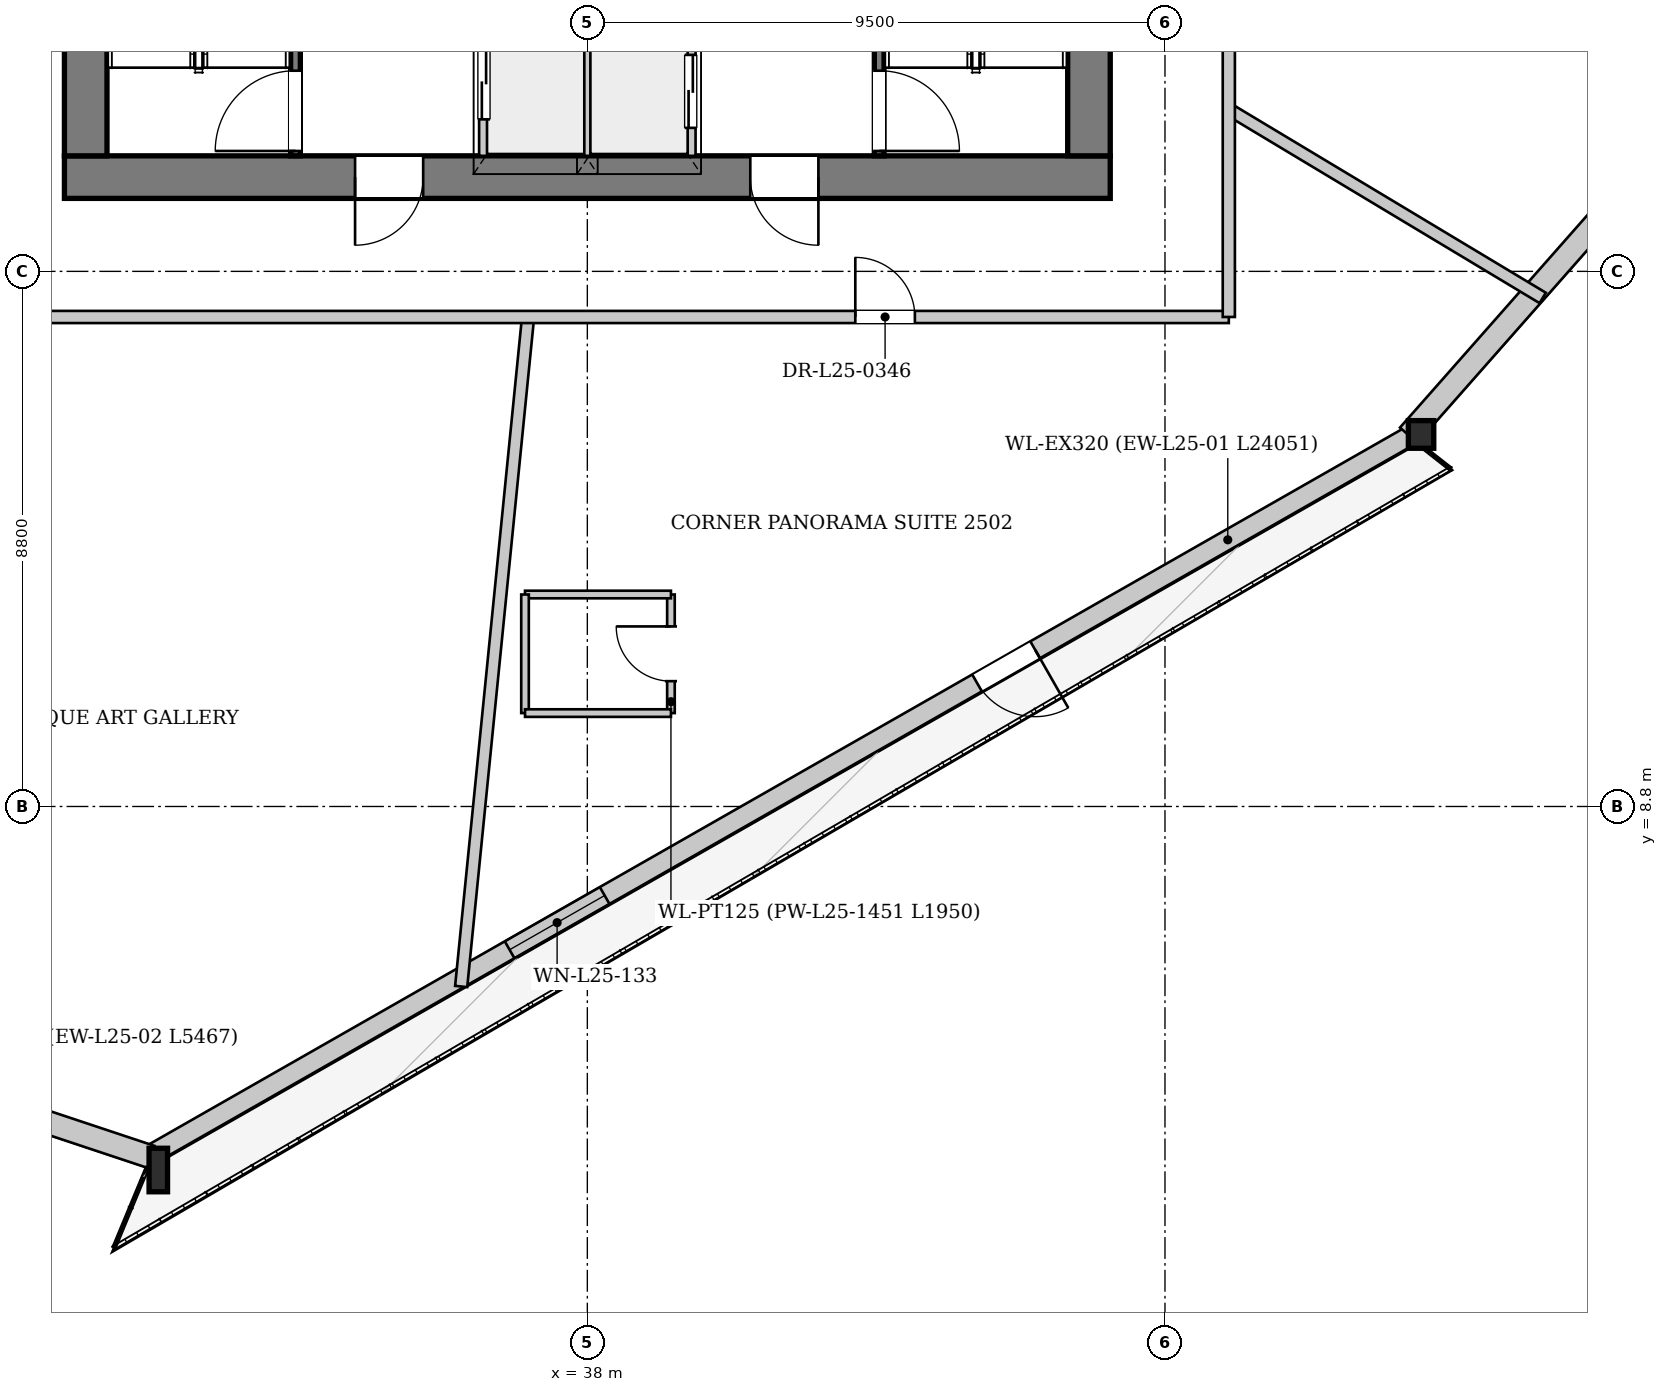
"""IFC4 building model, lengths in metres.
Left out: names, types, materials, properties, quantities, classifications, styles, units other than length and angle.
Written with IfcOpenShell. Run it as: python <this file> out.ifc"""

import sys

from ifc_helpers import new_model, si_unit, direction, frame, frame_2d, origin, origin_2d, place, context, subcontext, project, spatial, rectangle, i_section, extrude, source, transform, mapped, element, fill, save


model = new_model("IFC4")
c1 = context("Model", 3, precision=1e-05, world=origin(), true_north=direction((0.0, 1.0)))
c2 = subcontext(c1, "Body", "Model", "MODEL_VIEW")
j1 = project(units=[si_unit("LENGTHUNIT", "METRE"), si_unit("PLANEANGLEUNIT", "RADIAN")], contexts=[c1])
p1 = place(None, origin())
s1 = spatial("IfcSite", under=j1, at=p1, CompositionType="ELEMENT")
p2 = place(p1, origin())
s2 = spatial("IfcBuilding", under=s1, at=p2, CompositionType="ELEMENT")
p3 = place(p2, frame((0.0, 0.0, 98.6)))
s3 = spatial("IfcBuildingStorey", under=s2, at=p3, CompositionType="ELEMENT", Elevation=98.6)
m1 = source(origin(), c2, "Body", "SweptSolid", [
    extrude(i_section(OverallWidth=0.304, OverallDepth=0.716, WebThickness=0.021, FlangeThickness=0.04, at=origin_2d()), origin(), (0.0, 0.0, 1.0), 3.405),
])
p4 = place(p3, frame((30.762, 2.858, 0.0), z_axis=(0.107037692967, -0.021436215805, 0.994023853304), x_axis=(0.196368725397, 0.980530123803, 0.0)))
e1 = element("IfcColumn", 1, at=p4, inside=s3, PredefinedType="COLUMN", context=c2, shape_type="MappedRepresentation", body=[
    mapped(m1, transform((0.0, 0.0, 0.0), x_axis=(1.0, 0.0, 0.0), y_axis=(0.0, 1.0, 0.0), z_axis=(0.0, 0.0, 1.0), scale=1.0)),
])
m2 = source(origin(), c2, "Body", "SweptSolid", [
    extrude(i_section(OverallWidth=0.418, OverallDepth=0.455, WebThickness=0.038, FlangeThickness=0.059, at=origin_2d()), origin(), (0.0, 0.0, 1.0), 3.398),
])
p5 = place(p3, frame((51.65, 14.78, 0.0), z_axis=(0.036206217807, 0.081320314599, 0.996030178371), x_axis=(-0.913545119324, 0.40673740295, 0.0)))
e2 = element("IfcColumn", 2, at=p5, inside=s3, PredefinedType="COLUMN", context=c2, shape_type="MappedRepresentation", body=[
    mapped(m2, transform((0.0, 0.0, 0.0), x_axis=(1.0, 0.0, 0.0), y_axis=(0.0, 1.0, 0.0), z_axis=(0.0, 0.0, 1.0), scale=1.0)),
])
p6 = place(p3, frame((51.571, 14.919, 0.0), z_axis=(0.0, 0.0, 1.0), x_axis=(-0.868493525255, -0.495700510984, 0.0)))
e3 = element("IfcWall", 3, at=p6, inside=s3, PredefinedType="SOLIDWALL", context=c2, shape_type="SweptSolid", body=[
    extrude(rectangle(XDim=24.051, YDim=0.32, at=frame_2d((12.025, 0.0))), origin(), (0.0, 0.0, 1.0), 2.692),
])
p7 = place(p6, frame((7.146, 0.0, 0.0)))
e4 = element("IfcOpeningElement", 4, at=p7, cuts=e3, PredefinedType="OPENING", context=c2, shape_type="SweptSolid", body=[
    extrude(rectangle(XDim=1.1, YDim=2.3, at=frame_2d((0.55, 1.15))), frame((0.0, 0.17, 0.0), z_axis=(0.0, -1.0, 0.0), x_axis=(1.0, 0.0, 0.0)), (0.0, 0.0, 1.0), 0.34),
])
p8 = place(p6, frame((15.298, 0.0, 0.372)))
e5 = element("IfcOpeningElement", 5, at=p8, cuts=e3, PredefinedType="OPENING", context=c2, shape_type="SweptSolid", body=[
    extrude(rectangle(XDim=1.8, YDim=2.2, at=frame_2d((0.9, 1.1))), frame((0.0, 0.17, 0.0), z_axis=(0.0, -1.0, 0.0), x_axis=(1.0, 0.0, 0.0)), (0.0, 0.0, 1.0), 0.34),
])
p9 = place(p3, frame((30.822, 3.038, 0.0), z_axis=(0.0, 0.0, 1.0), x_axis=(-0.948870681526, 0.315665059424, 0.0)))
e6 = element("IfcWall", 6, at=p9, inside=s3, PredefinedType="SOLIDWALL", context=c2, shape_type="SweptSolid", body=[
    extrude(rectangle(XDim=5.467, YDim=0.38, at=frame_2d((2.734, 0.0))), origin(), (0.0, 0.0, 1.0), 2.692),
])
p10 = place(p3, frame((67.418, 32.942, 0.0), z_axis=(0.0, 0.0, 1.0), x_axis=(-0.661521919695, -0.749925829508, 0.0)))
e7 = element("IfcWall", 7, at=p10, inside=s3, PredefinedType="SOLIDWALL", context=c2, shape_type="SweptSolid", body=[
    extrude(rectangle(XDim=24.051, YDim=0.38, at=frame_2d((12.026, 0.0))), origin(), (0.0, 0.0, 1.0), 2.692),
])
p11 = place(p10, frame((6.134, 0.0, 0.65)))
e8 = element("IfcOpeningElement", 8, at=p11, cuts=e7, PredefinedType="OPENING", context=c2, shape_type="SweptSolid", body=[
    extrude(rectangle(XDim=1.2, YDim=1.5, at=frame_2d((0.6, 0.75))), frame((0.0, 0.2, 0.0), z_axis=(0.0, -1.0, 0.0), x_axis=(1.0, 0.0, 0.0)), (0.0, 0.0, 1.0), 0.4),
])
p12 = place(p10, frame((16.717, 0.0, 0.65)))
e9 = element("IfcOpeningElement", 9, at=p12, cuts=e7, PredefinedType="OPENING", context=c2, shape_type="SweptSolid", body=[
    extrude(rectangle(XDim=1.2, YDim=1.5, at=frame_2d((0.6, 0.75))), frame((0.0, 0.2, 0.0), z_axis=(0.0, -1.0, 0.0), x_axis=(1.0, 0.0, 0.0)), (0.0, 0.0, 1.0), 0.4),
])
p13 = place(p3, frame((46.6, 19.15, 0.0), z_axis=(0.0, 0.0, 1.0), x_axis=(-1.0, 0.0, 0.0)))
e10 = element("IfcWall", 10, at=p13, inside=s3, PredefinedType="SHEAR", context=c2, shape_type="SweptSolid", body=[
    extrude(rectangle(XDim=17.2, YDim=0.7, at=frame_2d((8.6, 0.0))), origin(), (0.0, 0.0, 1.0), 3.3),
])
p14 = place(p13, frame((4.8, 0.0, 0.0)))
e11 = element("IfcOpeningElement", 11, at=p14, cuts=e10, PredefinedType="OPENING", context=c2, shape_type="SweptSolid", body=[
    extrude(rectangle(XDim=1.12, YDim=2.25, at=frame_2d((0.56, 1.125))), frame((0.0, 0.36, 0.0), z_axis=(0.0, -1.0, 0.0), x_axis=(1.0, 0.0, 0.0)), (0.0, 0.0, 1.0), 0.72),
])
p15 = place(p13, frame((11.3, 0.0, 0.0)))
e12 = element("IfcOpeningElement", 12, at=p15, cuts=e10, PredefinedType="OPENING", context=c2, shape_type="SweptSolid", body=[
    extrude(rectangle(XDim=1.12, YDim=2.25, at=frame_2d((0.56, 1.125))), frame((0.0, 0.36, 0.0), z_axis=(0.0, -1.0, 0.0), x_axis=(1.0, 0.0, 0.0)), (0.0, 0.0, 1.0), 0.72),
])
p16 = place(p3, frame((29.75, 19.5, 0.0), z_axis=(0.0, 0.0, 1.0), x_axis=(0.0, 1.0, 0.0)))
e13 = element("IfcWall", 13, at=p16, inside=s3, PredefinedType="SHEAR", context=c2, shape_type="SweptSolid", body=[
    extrude(rectangle(XDim=14.2, YDim=0.7, at=frame_2d((7.1, 0.0))), origin(), (0.0, 0.0, 1.0), 3.3),
])
p17 = place(p16, frame((7.42, 0.0, 0.0)))
e14 = element("IfcOpeningElement", 14, at=p17, cuts=e13, PredefinedType="OPENING", context=c2, shape_type="SweptSolid", body=[
    extrude(rectangle(XDim=1.6, YDim=2.2, at=frame_2d((0.8, 1.1))), frame((0.0, 0.36, 0.0), z_axis=(0.0, -1.0, 0.0), x_axis=(1.0, 0.0, 0.0)), (0.0, 0.0, 1.0), 0.72),
])
p18 = place(p3, frame((46.25, 33.7, 0.0), z_axis=(0.0, 0.0, 1.0), x_axis=(0.0, -1.0, 0.0)))
e15 = element("IfcWall", 15, at=p18, inside=s3, PredefinedType="SHEAR", context=c2, shape_type="SweptSolid", body=[
    extrude(rectangle(XDim=14.2, YDim=0.7, at=frame_2d((7.1, 0.0))), origin(), (0.0, 0.0, 1.0), 3.3),
])
p19 = place(p18, frame((5.18, 0.0, 0.0)))
e16 = element("IfcOpeningElement", 16, at=p19, cuts=e15, PredefinedType="OPENING", context=c2, shape_type="SweptSolid", body=[
    extrude(rectangle(XDim=1.6, YDim=2.2, at=frame_2d((0.8, 1.1))), frame((0.0, 0.36, 0.0), z_axis=(0.0, -1.0, 0.0), x_axis=(1.0, 0.0, 0.0)), (0.0, 0.0, 1.0), 0.72),
])
p20 = place(p3, frame((33.2, 19.5, 0.0), z_axis=(0.0, 0.0, 1.0), x_axis=(0.0, 1.0, 0.0)))
e17 = element("IfcWall", 17, at=p20, inside=s3, PredefinedType="PARTITIONING", context=c2, shape_type="SweptSolid", body=[
    extrude(rectangle(XDim=7.46, YDim=0.16, at=frame_2d((3.73, 0.0))), origin(), (0.0, 0.0, 1.0), 3.3),
])
p21 = place(p20, frame((0.08, 0.0, 0.0)))
e18 = element("IfcOpeningElement", 18, at=p21, cuts=e17, PredefinedType="OPENING", context=c2, shape_type="SweptSolid", body=[
    extrude(rectangle(XDim=1.32, YDim=2.2, at=frame_2d((0.66, 1.1))), frame((0.0, 0.09, 0.0), z_axis=(0.0, -1.0, 0.0), x_axis=(1.0, 0.0, 0.0)), (0.0, 0.0, 1.0), 0.18),
])
p22 = place(p3, frame((42.8, 26.96, 0.0), z_axis=(0.0, 0.0, 1.0), x_axis=(0.0, -1.0, 0.0)))
e19 = element("IfcWall", 19, at=p22, inside=s3, PredefinedType="PARTITIONING", context=c2, shape_type="SweptSolid", body=[
    extrude(rectangle(XDim=7.46, YDim=0.16, at=frame_2d((3.73, 0.0))), origin(), (0.0, 0.0, 1.0), 3.3),
])
p23 = place(p22, frame((6.06, 0.0, 0.0)))
e20 = element("IfcOpeningElement", 20, at=p23, cuts=e19, PredefinedType="OPENING", context=c2, shape_type="SweptSolid", body=[
    extrude(rectangle(XDim=1.32, YDim=2.2, at=frame_2d((0.66, 1.1))), frame((0.0, 0.09, 0.0), z_axis=(0.0, -1.0, 0.0), x_axis=(1.0, 0.0, 0.0)), (0.0, 0.0, 1.0), 0.18),
])
p24 = place(p3, frame((36.3, 19.5, 0.0), z_axis=(0.0, 0.0, 1.0), x_axis=(0.0, 1.0, 0.0)))
e21 = element("IfcWall", 21, at=p24, inside=s3, PredefinedType="PARTITIONING", context=c2, shape_type="SweptSolid", body=[
    extrude(rectangle(XDim=4.78, YDim=0.16, at=frame_2d((2.39, 0.0))), origin(), (0.0, 0.0, 1.0), 3.3),
])
p25 = place(p24, frame((0.6, 0.0, 0.0)))
e22 = element("IfcOpeningElement", 22, at=p25, cuts=e21, PredefinedType="OPENING", context=c2, shape_type="SweptSolid", body=[
    extrude(rectangle(XDim=1.2, YDim=2.2, at=frame_2d((0.6, 1.1))), frame((0.0, 0.09, 0.0), z_axis=(0.0, -1.0, 0.0), x_axis=(1.0, 0.0, 0.0)), (0.0, 0.0, 1.0), 0.18),
])
p26 = place(p24, frame((2.65, 0.0, 0.0)))
e23 = element("IfcOpeningElement", 23, at=p26, cuts=e21, PredefinedType="OPENING", context=c2, shape_type="SweptSolid", body=[
    extrude(rectangle(XDim=0.95, YDim=2.1, at=frame_2d((0.475, 1.05))), frame((0.0, 0.09, 0.0), z_axis=(0.0, -1.0, 0.0), x_axis=(1.0, 0.0, 0.0)), (0.0, 0.0, 1.0), 0.18),
])
p27 = place(p3, frame((39.7, 24.28, 0.0), z_axis=(0.0, 0.0, 1.0), x_axis=(0.0, -1.0, 0.0)))
e24 = element("IfcWall", 24, at=p27, inside=s3, PredefinedType="PARTITIONING", context=c2, shape_type="SweptSolid", body=[
    extrude(rectangle(XDim=4.78, YDim=0.16, at=frame_2d((2.39, 0.0))), origin(), (0.0, 0.0, 1.0), 3.3),
])
p28 = place(p27, frame((3.12, 0.0, 0.0)))
e25 = element("IfcOpeningElement", 25, at=p28, cuts=e24, PredefinedType="OPENING", context=c2, shape_type="SweptSolid", body=[
    extrude(rectangle(XDim=1.2, YDim=2.2, at=frame_2d((0.6, 1.1))), frame((0.0, 0.09, 0.0), z_axis=(0.0, -1.0, 0.0), x_axis=(1.0, 0.0, 0.0)), (0.0, 0.0, 1.0), 0.18),
])
p29 = place(p3, frame((38.0, 19.5, 0.0), z_axis=(0.0, 0.0, 1.0), x_axis=(0.0, 1.0, 0.0)))
e26 = element("IfcWall", 26, at=p29, inside=s3, PredefinedType="PARTITIONING", context=c2, shape_type="SweptSolid", body=[
    extrude(rectangle(XDim=2.46, YDim=0.125, at=frame_2d((1.23, 0.0))), origin(), (0.0, 0.0, 1.0), 3.3),
])
p30 = place(p3, frame((37.025, 16.85, 0.0), z_axis=(0.0, 0.0, 1.0), x_axis=(-0.099462213359, -0.995041339902, 0.0)))
e27 = element("IfcWall", 27, at=p30, inside=s3, PredefinedType="PARTITIONING", context=c2, shape_type="SweptSolid", body=[
    extrude(rectangle(XDim=11.065, YDim=0.2, at=frame_2d((5.533, 0.0))), origin(), (0.0, 0.0, 1.0), 3.3),
])
p31 = place(p3, frame((48.55, 20.264, 0.0), z_axis=(0.0, 0.0, 1.0), x_axis=(0.857260317922, -0.514883236586, 0.0)))
e28 = element("IfcWall", 28, at=p31, inside=s3, PredefinedType="PARTITIONING", context=c2, shape_type="SweptSolid", body=[
    extrude(rectangle(XDim=6.022, YDim=0.2, at=frame_2d((3.011, 0.0))), origin(), (0.0, 0.0, 1.0), 3.3),
])
p32 = place(p3, frame((39.375, 10.336, 0.0), z_axis=(0.0, 0.0, 1.0), x_axis=(0.0, 1.0, 0.0)))
e29 = element("IfcWall", 29, at=p32, inside=s3, PredefinedType="PARTITIONING", context=c2, shape_type="SweptSolid", body=[
    extrude(rectangle(XDim=1.95, YDim=0.125, at=frame_2d((0.975, 0.0))), origin(), (0.0, 0.0, 1.0), 3.3),
])
p33 = place(p32, frame((0.525, 0.0, 0.0)))
e30 = element("IfcOpeningElement", 30, at=p33, cuts=e29, PredefinedType="OPENING", context=c2, shape_type="SweptSolid", body=[
    extrude(rectangle(XDim=0.9, YDim=2.1, at=frame_2d((0.45, 1.05))), frame((0.0, 0.073, 0.0), z_axis=(0.0, -1.0, 0.0), x_axis=(1.0, 0.0, 0.0)), (0.0, 0.0, 1.0), 0.145),
])
p34 = place(p3, frame((39.375, 12.286, 0.0), z_axis=(0.0, 0.0, 1.0), x_axis=(-1.0, 0.0, 0.0)))
e31 = element("IfcWall", 31, at=p34, inside=s3, PredefinedType="PARTITIONING", context=c2, shape_type="SweptSolid", body=[
    extrude(rectangle(XDim=2.4, YDim=0.125, at=frame_2d((1.2, 0.0))), origin(), (0.0, 0.0, 1.0), 2.925),
])
p35 = place(p3, frame((36.975, 12.286, 0.0), z_axis=(0.0, 0.0, 1.0), x_axis=(0.0, -1.0, 0.0)))
e32 = element("IfcWall", 32, at=p35, inside=s3, PredefinedType="PARTITIONING", context=c2, shape_type="SweptSolid", body=[
    extrude(rectangle(XDim=1.95, YDim=0.125, at=frame_2d((0.975, 0.0))), origin(), (0.0, 0.0, 1.0), 3.3),
])
p36 = place(p3, frame((36.975, 10.336, 0.0), z_axis=(0.0, 0.0, 1.0), x_axis=(1.0, 0.0, 0.0)))
e33 = element("IfcWall", 33, at=p36, inside=s3, PredefinedType="PARTITIONING", context=c2, shape_type="SweptSolid", body=[
    extrude(rectangle(XDim=2.4, YDim=0.125, at=frame_2d((1.2, 0.0))), origin(), (0.0, 0.0, 1.0), 3.3),
])
p37 = place(p3, frame((27.45, 16.85, 0.0), z_axis=(0.0, 0.0, 1.0), x_axis=(1.0, 0.0, 0.0)))
e34 = element("IfcWall", 34, at=p37, inside=s3, PredefinedType="PARTITIONING", context=c2, shape_type="SweptSolid", body=[
    extrude(rectangle(XDim=21.1, YDim=0.2, at=frame_2d((10.55, 0.0))), origin(), (0.0, 0.0, 1.0), 3.3),
])
p38 = place(p37, frame((0.3, 0.0, 0.0)))
e35 = element("IfcOpeningElement", 35, at=p38, cuts=e34, PredefinedType="OPENING", context=c2, shape_type="SweptSolid", body=[
    extrude(rectangle(XDim=0.98, YDim=2.15, at=frame_2d((0.49, 1.075))), frame((0.0, 0.11, 0.0), z_axis=(0.0, -1.0, 0.0), x_axis=(1.0, 0.0, 0.0)), (0.0, 0.0, 1.0), 0.22),
])
p39 = place(p37, frame((14.957, 0.0, 0.0)))
e36 = element("IfcOpeningElement", 36, at=p39, cuts=e34, PredefinedType="OPENING", context=c2, shape_type="SweptSolid", body=[
    extrude(rectangle(XDim=0.98, YDim=2.15, at=frame_2d((0.49, 1.075))), frame((0.0, 0.11, 0.0), z_axis=(0.0, -1.0, 0.0), x_axis=(1.0, 0.0, 0.0)), (0.0, 0.0, 1.0), 0.22),
])
p40 = place(p3, frame((48.55, 16.85, 0.0), z_axis=(0.0, 0.0, 1.0), x_axis=(0.0, 1.0, 0.0)))
e37 = element("IfcWall", 37, at=p40, inside=s3, PredefinedType="PARTITIONING", context=c2, shape_type="SweptSolid", body=[
    extrude(rectangle(XDim=19.5, YDim=0.2, at=frame_2d((9.75, 0.0))), origin(), (0.0, 0.0, 1.0), 3.3),
])
p41 = place(p40, frame((7.746, 0.0, 0.0)))
e38 = element("IfcOpeningElement", 38, at=p41, cuts=e37, PredefinedType="OPENING", context=c2, shape_type="SweptSolid", body=[
    extrude(rectangle(XDim=0.98, YDim=2.15, at=frame_2d((0.49, 1.075))), frame((0.0, 0.11, 0.0), z_axis=(0.0, -1.0, 0.0), x_axis=(1.0, 0.0, 0.0)), (0.0, 0.0, 1.0), 0.22),
])
m3 = source(origin(), c2, "Body", "SweptSolid", [
    extrude(rectangle(XDim=1.1, YDim=2.3, at=frame_2d((0.55, 1.15))), frame((0.0, 0.025, 0.0), z_axis=(0.0, -1.0, 0.0), x_axis=(1.0, 0.0, 0.0)), (0.0, 0.0, 1.0), 0.05),
])
p42 = place(p7, origin())
e39 = element("IfcDoor", 39, at=p42, inside=s3, OperationType="SINGLE_SWING_LEFT", PredefinedType="DOOR", context=c2, shape_type="MappedRepresentation", body=[
    mapped(m3, transform((0.0, 0.0, 0.0), x_axis=(1.0, 0.0, 0.0), y_axis=(0.0, 1.0, 0.0), z_axis=(0.0, 0.0, 1.0), scale=1.0)),
])
fill(e4, e39)
m4 = source(origin(), c2, "Body", "SweptSolid", [
    extrude(rectangle(XDim=1.8, YDim=2.2, at=frame_2d((0.9, 1.1))), frame((0.0, 0.03, 0.0), z_axis=(0.0, -1.0, 0.0), x_axis=(1.0, 0.0, 0.0)), (0.0, 0.0, 1.0), 0.06),
])
p43 = place(p8, origin())
e40 = element("IfcWindow", 40, at=p43, inside=s3, PartitioningType="SINGLE_PANEL", PredefinedType="WINDOW", context=c2, shape_type="MappedRepresentation", body=[
    mapped(m4, transform((0.0, 0.0, 0.0), x_axis=(1.0, 0.0, 0.0), y_axis=(0.0, 1.0, 0.0), z_axis=(0.0, 0.0, 1.0), scale=1.0)),
])
fill(e5, e40)
m5 = source(origin(), c2, "Body", "SweptSolid", [
    extrude(rectangle(XDim=1.12, YDim=2.25, at=frame_2d((0.56, 1.125))), frame((0.0, 0.025, 0.0), z_axis=(0.0, -1.0, 0.0), x_axis=(1.0, 0.0, 0.0)), (0.0, 0.0, 1.0), 0.05),
])
p44 = place(p14, origin())
e41 = element("IfcDoor", 41, at=p44, inside=s3, OperationType="SINGLE_SWING_LEFT", PredefinedType="DOOR", context=c2, shape_type="MappedRepresentation", body=[
    mapped(m5, transform((0.0, 0.0, 0.0), x_axis=(1.0, 0.0, 0.0), y_axis=(0.0, 1.0, 0.0), z_axis=(0.0, 0.0, 1.0), scale=1.0)),
])
fill(e11, e41)
p45 = place(p15, origin())
e42 = element("IfcDoor", 42, at=p45, inside=s3, OperationType="SINGLE_SWING_RIGHT", PredefinedType="DOOR", context=c2, shape_type="MappedRepresentation", body=[
    mapped(m5, transform((0.0, 0.0, 0.0), x_axis=(1.0, 0.0, 0.0), y_axis=(0.0, 1.0, 0.0), z_axis=(0.0, 0.0, 1.0), scale=1.0)),
])
fill(e12, e42)
m6 = source(origin(), c2, "Body", "SweptSolid", [
    extrude(rectangle(XDim=1.32, YDim=2.2, at=frame_2d((0.66, 1.1))), frame((0.0, 0.025, 0.0), z_axis=(0.0, -1.0, 0.0), x_axis=(1.0, 0.0, 0.0)), (0.0, 0.0, 1.0), 0.05),
])
p46 = place(p21, origin())
e43 = element("IfcDoor", 43, at=p46, inside=s3, OperationType="SINGLE_SWING_LEFT", PredefinedType="DOOR", context=c2, shape_type="MappedRepresentation", body=[
    mapped(m6, transform((0.0, 0.0, 0.0), x_axis=(1.0, 0.0, 0.0), y_axis=(0.0, 1.0, 0.0), z_axis=(0.0, 0.0, 1.0), scale=1.0)),
])
fill(e18, e43)
p47 = place(p23, origin())
e44 = element("IfcDoor", 44, at=p47, inside=s3, OperationType="SINGLE_SWING_RIGHT", PredefinedType="DOOR", context=c2, shape_type="MappedRepresentation", body=[
    mapped(m6, transform((0.0, 0.0, 0.0), x_axis=(1.0, 0.0, 0.0), y_axis=(0.0, 1.0, 0.0), z_axis=(0.0, 0.0, 1.0), scale=1.0)),
])
fill(e20, e44)
m7 = source(origin(), c2, "Body", "SweptSolid", [
    extrude(rectangle(XDim=1.2, YDim=2.2, at=frame_2d((0.6, 1.1))), frame((0.0, 0.025, 0.0), z_axis=(0.0, -1.0, 0.0), x_axis=(1.0, 0.0, 0.0)), (0.0, 0.0, 1.0), 0.05),
])
p48 = place(p25, origin())
e45 = element("IfcDoor", 45, at=p48, inside=s3, OperationType="DOUBLE_DOOR_SLIDING", PredefinedType="DOOR", context=c2, shape_type="MappedRepresentation", body=[
    mapped(m7, transform((0.0, 0.0, 0.0), x_axis=(1.0, 0.0, 0.0), y_axis=(0.0, 1.0, 0.0), z_axis=(0.0, 0.0, 1.0), scale=1.0)),
])
fill(e22, e45)
p49 = place(p28, origin())
e46 = element("IfcDoor", 46, at=p49, inside=s3, OperationType="DOUBLE_DOOR_SLIDING", PredefinedType="DOOR", context=c2, shape_type="MappedRepresentation", body=[
    mapped(m7, transform((0.0, 0.0, 0.0), x_axis=(1.0, 0.0, 0.0), y_axis=(0.0, 1.0, 0.0), z_axis=(0.0, 0.0, 1.0), scale=1.0)),
])
fill(e25, e46)
m8 = source(origin(), c2, "Body", "SweptSolid", [
    extrude(rectangle(XDim=0.9, YDim=2.1, at=frame_2d((0.45, 1.05))), frame((0.0, 0.025, 0.0), z_axis=(0.0, -1.0, 0.0), x_axis=(1.0, 0.0, 0.0)), (0.0, 0.0, 1.0), 0.05),
])
p50 = place(p33, origin())
e47 = element("IfcDoor", 47, at=p50, inside=s3, OperationType="SINGLE_SWING_RIGHT", PredefinedType="DOOR", context=c2, shape_type="MappedRepresentation", body=[
    mapped(m8, transform((0.0, 0.0, 0.0), x_axis=(1.0, 0.0, 0.0), y_axis=(0.0, 1.0, 0.0), z_axis=(0.0, 0.0, 1.0), scale=1.0)),
])
fill(e30, e47)
m9 = source(origin(), c2, "Body", "SweptSolid", [
    extrude(rectangle(XDim=0.98, YDim=2.15, at=frame_2d((0.49, 1.075))), frame((0.0, 0.025, 0.0), z_axis=(0.0, -1.0, 0.0), x_axis=(1.0, 0.0, 0.0)), (0.0, 0.0, 1.0), 0.05),
])
p51 = place(p39, origin())
e48 = element("IfcDoor", 48, at=p51, inside=s3, OperationType="SINGLE_SWING_LEFT", PredefinedType="DOOR", context=c2, shape_type="MappedRepresentation", body=[
    mapped(m9, transform((0.0, 0.0, 0.0), x_axis=(1.0, 0.0, 0.0), y_axis=(0.0, 1.0, 0.0), z_axis=(0.0, 0.0, 1.0), scale=1.0)),
])
fill(e36, e48)
save(model, sys.argv[1])
